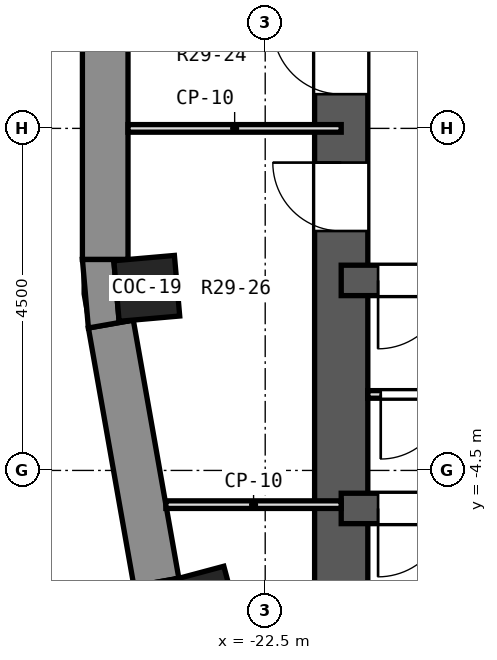
"""IFC4 building model, lengths in metres.
Left out: names, types, materials, properties, quantities, classifications, styles, units other than length and angle.
Written with IfcOpenShell. Run it as: python <this file> out.ifc"""

import sys

from ifc_helpers import new_model, si_unit, direction, frame, frame_2d, origin, origin_2d, place, context, subcontext, project, spatial, polyline, rectangle, outline, extrude, element, fill, save


model = new_model("IFC4")
c1 = context("Model", 3, precision=1e-05, world=origin(), true_north=direction((0.0, 1.0)))
c2 = subcontext(c1, "Body", "Model", "MODEL_VIEW")
j1 = project(units=[si_unit("LENGTHUNIT", "METRE"), si_unit("PLANEANGLEUNIT", "RADIAN")], contexts=[c1])
p1 = place(None, origin())
s1 = spatial("IfcSite", under=j1, at=p1, CompositionType="ELEMENT")
p2 = place(p1, origin())
s2 = spatial("IfcBuilding", under=s1, at=p2, CompositionType="ELEMENT")
p3 = place(p2, frame((0.0, 0.0, 200.4)))
s3 = spatial("IfcBuildingStorey", under=s2, at=p3, CompositionType="ELEMENT", Elevation=200.4)
for number, where, z_axis, x_axis in (
    (1, (-24.058, -2.105, 0.0), (0.0, 0.0, 1.0), (-0.996, -0.087, 0.0)),
    (2, (-23.327, -6.25, 0.0), (0.0, 0.0, 1.0), (-0.966, -0.259, 0.0)),
):
    element("IfcColumn", number, at=place(p3, frame(where, z_axis=z_axis, x_axis=x_axis)), inside=s3, PredefinedType="COLUMN", context=c2, shape_type="SweptSolid", body=[
        extrude(rectangle(XDim=0.8, YDim=0.8, at=origin_2d()), origin(), (0.0, 0.0, 1.0), 3.3),
    ])
p4 = place(p3, frame((-21.5, -9.0, 0.0), z_axis=(0.0, 0.0, 1.0), x_axis=(0.0, 1.0, 0.0)))
e3 = element("IfcWall", 3, at=p4, inside=s3, PredefinedType="SHEAR", context=c2, shape_type="SweptSolid", body=[
    extrude(rectangle(XDim=18.0, YDim=0.7, at=frame_2d((9.0, 0.0))), origin(), (0.0, 0.0, 1.0), 3.3),
])
p5 = place(p4, frame((9.45, 0.0, 0.0)))
e4 = element("IfcOpeningElement", 4, at=p5, cuts=e3, PredefinedType="OPENING", context=c2, shape_type="SweptSolid", body=[
    extrude(rectangle(XDim=0.9, YDim=2.1, at=frame_2d((0.45, 1.05))), frame((0.0, 0.362, 0.0), z_axis=(0.0, -1.0, 0.0), x_axis=(1.0, 0.0, 0.0)), (0.0, 0.0, 1.0), 0.724),
])
p6 = place(p4, frame((7.65, 0.0, 0.0)))
e5 = element("IfcOpeningElement", 5, at=p6, cuts=e3, PredefinedType="OPENING", context=c2, shape_type="SweptSolid", body=[
    extrude(rectangle(XDim=0.9, YDim=2.1, at=frame_2d((0.45, 1.05))), frame((0.0, 0.362, 0.0), z_axis=(0.0, -1.0, 0.0), x_axis=(1.0, 0.0, 0.0)), (0.0, 0.0, 1.0), 0.724),
])
p7 = place(p3, frame((-13.5, -5.0, 0.0), z_axis=(0.0, 0.0, 1.0), x_axis=(-1.0, 0.0, 0.0)))
e6 = element("IfcWall", 6, at=p7, inside=s3, PredefinedType="SHEAR", context=c2, shape_type="SweptSolid", body=[
    extrude(rectangle(XDim=8.0, YDim=0.4, at=frame_2d((4.0, 0.0))), origin(), (0.0, 0.0, 1.0), 3.3),
])
p8 = place(p7, frame((6.615, 0.0, 0.0)))
e7 = element("IfcOpeningElement", 7, at=p8, cuts=e6, PredefinedType="OPENING", context=c2, shape_type="SweptSolid", body=[
    extrude(rectangle(XDim=0.9, YDim=2.1, at=frame_2d((0.45, 1.05))), frame((0.0, 0.212, 0.0), z_axis=(0.0, -1.0, 0.0), x_axis=(1.0, 0.0, 0.0)), (0.0, 0.0, 1.0), 0.424),
])
p9 = place(p7, frame((0.45, 0.0, 0.0)))
e8 = element("IfcOpeningElement", 8, at=p9, cuts=e6, PredefinedType="OPENING", context=c2, shape_type="SweptSolid", body=[
    extrude(rectangle(XDim=1.1, YDim=2.1, at=frame_2d((0.55, 1.05))), frame((0.0, 0.212, 0.0), z_axis=(0.0, -1.0, 0.0), x_axis=(1.0, 0.0, 0.0)), (0.0, 0.0, 1.0), 0.424),
])
p10 = place(p3, frame((-13.5, -2.0, 0.0), z_axis=(0.0, 0.0, 1.0), x_axis=(-1.0, 0.0, 0.0)))
e9 = element("IfcWall", 9, at=p10, inside=s3, PredefinedType="SHEAR", context=c2, shape_type="SweptSolid", body=[
    extrude(rectangle(XDim=8.0, YDim=0.4, at=frame_2d((4.0, 0.0))), origin(), (0.0, 0.0, 1.0), 3.3),
])
p11 = place(p10, frame((1.19, 0.0, 0.0)))
e10 = element("IfcOpeningElement", 10, at=p11, cuts=e9, PredefinedType="OPENING", context=c2, shape_type="SweptSolid", body=[
    extrude(rectangle(XDim=1.0, YDim=2.1, at=frame_2d((0.5, 1.05))), frame((0.0, 0.212, 0.0), z_axis=(0.0, -1.0, 0.0), x_axis=(1.0, 0.0, 0.0)), (0.0, 0.0, 1.0), 0.424),
])
p12 = place(p10, frame((5.445, 0.0, 0.0)))
e11 = element("IfcOpeningElement", 11, at=p12, cuts=e9, PredefinedType="OPENING", context=c2, shape_type="SweptSolid", body=[
    extrude(rectangle(XDim=0.9, YDim=2.1, at=frame_2d((0.45, 1.05))), frame((0.0, 0.212, 0.0), z_axis=(0.0, -1.0, 0.0), x_axis=(1.0, 0.0, 0.0)), (0.0, 0.0, 1.0), 0.424),
])
p13 = place(p10, frame((6.615, 0.0, 0.0)))
e12 = element("IfcOpeningElement", 12, at=p13, cuts=e9, PredefinedType="OPENING", context=c2, shape_type="SweptSolid", body=[
    extrude(rectangle(XDim=0.9, YDim=2.1, at=frame_2d((0.45, 1.05))), frame((0.0, 0.212, 0.0), z_axis=(0.0, -1.0, 0.0), x_axis=(1.0, 0.0, 0.0)), (0.0, 0.0, 1.0), 0.424),
])
for number, where, z_axis, x_axis in (
    (13, (-24.605, 1.725, 0.0), (0.0, 0.0, 1.0), (0.0, -1.0, 0.0)),
    (14, (-24.531, -2.574, 0.0), (0.0, 0.0, 1.0), (0.174, -0.985, 0.0)),
):
    element("IfcWall", number, at=place(p3, frame(where, z_axis=z_axis, x_axis=x_axis)), inside=s3, PredefinedType="SOLIDWALL", context=c2, shape_type="SweptSolid", body=[
        extrude(rectangle(XDim=3.45, YDim=0.6, at=frame_2d((1.725, 0.0))), origin(), (0.0, 0.0, 1.0), 2.85),
    ])
p14 = place(p3, origin())
e15 = element("IfcWall", 15, at=p14, inside=s3, PredefinedType="SOLIDWALL", context=c2, shape_type="SweptSolid", body=[
    extrude(outline(polyline([(-24.905, -1.725), (-24.826, -2.626), (-24.235, -2.522), (-24.422, -2.538), (-24.491, -1.741), (-24.305, -1.725), (-24.905, -1.725)])), origin(), (0.0, 0.0, 1.0), 2.85),
])
p15 = place(p3, origin())
e16 = element("IfcWall", 16, at=p15, inside=s3, PredefinedType="SOLIDWALL", context=c2, shape_type="SweptSolid", body=[
    extrude(outline(polyline([(-24.227, -6.023), (-23.993, -6.897), (-23.429, -6.692), (-23.61, -6.74), (-23.817, -5.968), (-23.636, -5.919), (-24.227, -6.023)])), origin(), (0.0, 0.0, 1.0), 2.85),
])
p16 = place(p3, frame((-21.5, -4.95, 0.0), z_axis=(0.0, 0.0, 1.0), x_axis=(-1.0, 0.0, 0.0)))
e17 = element("IfcWall", 17, at=p16, inside=s3, PredefinedType="PARTITIONING", context=c2, shape_type="SweptSolid", body=[
    extrude(rectangle(XDim=2.307, YDim=0.1, at=frame_2d((1.153, 0.0))), origin(), (0.0, 0.0, 1.0), 2.85),
])
p17 = place(p3, frame((-21.5, 0.0, 0.0), z_axis=(0.0, 0.0, 1.0), x_axis=(-1.0, 0.0, 0.0)))
e18 = element("IfcWall", 18, at=p17, inside=s3, PredefinedType="PARTITIONING", context=c2, shape_type="SweptSolid", body=[
    extrude(rectangle(XDim=2.805, YDim=0.1, at=frame_2d((1.402, 0.0))), origin(), (0.0, 0.0, 1.0), 2.85),
])
p18 = place(p3, frame((-19.98, -3.5, 0.0), z_axis=(0.0, 0.0, 1.0), x_axis=(-1.0, 0.0, 0.0)))
e19 = element("IfcWall", 19, at=p18, inside=s3, PredefinedType="PARTITIONING", context=c2, shape_type="SweptSolid", body=[
    extrude(rectangle(XDim=1.17, YDim=0.1, at=frame_2d((0.585, 0.0))), origin(), (0.0, 0.0, 1.0), 2.85),
])
p19 = place(p18, frame((0.15, 0.0, 0.0)))
e20 = element("IfcOpeningElement", 20, at=p19, cuts=e19, PredefinedType="OPENING", context=c2, shape_type="SweptSolid", body=[
    extrude(rectangle(XDim=0.85, YDim=2.1, at=frame_2d((0.425, 1.05))), frame((0.0, 0.062, 0.0), z_axis=(0.0, -1.0, 0.0), x_axis=(1.0, 0.0, 0.0)), (0.0, 0.0, 1.0), 0.124),
])
p20 = place(p13, origin())
e21 = element("IfcDoor", 21, at=p20, inside=s3, OperationType="SINGLE_SWING_RIGHT", PredefinedType="DOOR", context=c2, shape_type="SweptSolid", body=[
    extrude(rectangle(XDim=0.9, YDim=2.1, at=frame_2d((0.45, 1.05))), frame((0.0, 0.025, 0.0), z_axis=(0.0, -1.0, 0.0), x_axis=(1.0, 0.0, 0.0)), (0.0, 0.0, 1.0), 0.05),
])
fill(e12, e21)
p21 = place(p5, origin())
e22 = element("IfcDoor", 22, at=p21, inside=s3, OperationType="SINGLE_SWING_RIGHT", PredefinedType="DOOR", context=c2, shape_type="SweptSolid", body=[
    extrude(rectangle(XDim=0.9, YDim=2.1, at=frame_2d((0.45, 1.05))), frame((0.0, 0.025, 0.0), z_axis=(0.0, -1.0, 0.0), x_axis=(1.0, 0.0, 0.0)), (0.0, 0.0, 1.0), 0.05),
])
fill(e4, e22)
p22 = place(p6, origin())
e23 = element("IfcDoor", 23, at=p22, inside=s3, OperationType="SINGLE_SWING_RIGHT", PredefinedType="DOOR", context=c2, shape_type="SweptSolid", body=[
    extrude(rectangle(XDim=0.9, YDim=2.1, at=frame_2d((0.45, 1.05))), frame((0.0, 0.025, 0.0), z_axis=(0.0, -1.0, 0.0), x_axis=(1.0, 0.0, 0.0)), (0.0, 0.0, 1.0), 0.05),
])
fill(e5, e23)
p23 = place(p19, origin())
e24 = element("IfcDoor", 24, at=p23, inside=s3, OperationType="SINGLE_SWING_RIGHT", PredefinedType="DOOR", context=c2, shape_type="SweptSolid", body=[
    extrude(rectangle(XDim=0.85, YDim=2.1, at=frame_2d((0.425, 1.05))), frame((0.0, 0.025, 0.0), z_axis=(0.0, -1.0, 0.0), x_axis=(1.0, 0.0, 0.0)), (0.0, 0.0, 1.0), 0.05),
])
fill(e20, e24)
p24 = place(p8, origin())
e25 = element("IfcDoor", 25, at=p24, inside=s3, OperationType="SINGLE_SWING_RIGHT", PredefinedType="DOOR", context=c2, shape_type="SweptSolid", body=[
    extrude(rectangle(XDim=0.9, YDim=2.1, at=frame_2d((0.45, 1.05))), frame((0.0, 0.025, 0.0), z_axis=(0.0, -1.0, 0.0), x_axis=(1.0, 0.0, 0.0)), (0.0, 0.0, 1.0), 0.05),
])
fill(e7, e25)
save(model, sys.argv[1])
